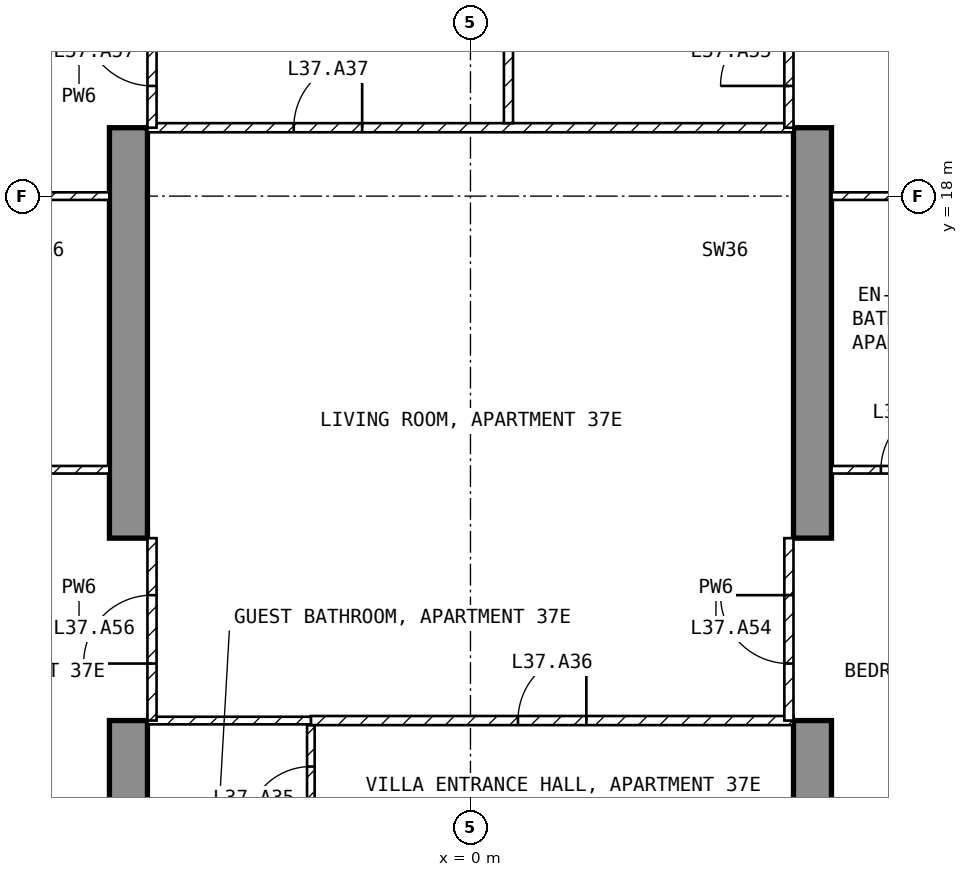
"""IFC4 building model, lengths in metres.
Left out: names, types, materials, properties, quantities, classifications, styles, units other than length and angle.
Written with IfcOpenShell. Run it as: python <this file> out.ifc"""

import sys

from ifc_helpers import new_model, si_unit, direction, frame, frame_2d, origin, place, context, subcontext, project, spatial, polyline, rectangle, outline, extrude, element, fill, save


model = new_model("IFC4")
c1 = context("Model", 3, precision=1e-05, world=origin(), true_north=direction((0.0, 1.0)))
c2 = subcontext(c1, "Body", "Model", "MODEL_VIEW")
j1 = project(units=[si_unit("LENGTHUNIT", "METRE"), si_unit("PLANEANGLEUNIT", "RADIAN")], contexts=[c1])
p1 = place(None, origin())
s1 = spatial("IfcSite", under=j1, at=p1, CompositionType="ELEMENT")
p2 = place(p1, origin())
s2 = spatial("IfcBuilding", under=s1, at=p2, CompositionType="ELEMENT")
p3 = place(p2, frame((0.0, 0.0, 151.4)))
s3 = spatial("IfcBuildingStorey", under=s2, at=p3, CompositionType="ELEMENT", Elevation=151.4)
for number, where, z_axis, x_axis in (
    (1, (-4.75, 9.0, -0.25), (1.0, 0.0, 0.0), (0.0, 1.0, 0.0)),
    (2, (4.25, 9.0, -0.25), (1.0, 0.0, 0.0), (0.0, 1.0, 0.0)),
):
    element("IfcWall", number, at=place(p3, frame(where, z_axis=z_axis, x_axis=x_axis)), inside=s3, PredefinedType="SHEAR", context=c2, shape_type="SweptSolid", body=[
        extrude(outline(polyline([(0.0, 0.0), (2.1, 0.0), (2.1, 2.65), (4.5, 2.65), (4.5, 0.0), (9.9, 0.0), (9.9, 2.65), (12.3, 2.65), (12.3, 0.0), (16.55, 0.0), (16.55, 3.45), (0.0, 3.45), (0.0, 0.0)])), origin(), (0.0, 0.0, 1.0), 0.5),
    ])
p4 = place(p3, frame((-2.1, 9.1, 0.0), z_axis=(0.0, 0.0, 1.0), x_axis=(0.0, 1.0, 0.0)))
e3 = element("IfcWall", 3, at=p4, inside=s3, PredefinedType="PARTITIONING", context=c2, shape_type="SweptSolid", body=[
    extrude(rectangle(XDim=1.94, YDim=0.1, at=frame_2d((0.97, 0.0))), origin(), (0.0, 0.0, 1.0), 3.2),
])
p5 = place(p4, frame((0.545, 0.0, 0.0)))
e4 = element("IfcOpeningElement", 4, at=p5, cuts=e3, PredefinedType="OPENING", context=c2, shape_type="SweptSolid", body=[
    extrude(rectangle(XDim=0.85, YDim=2.1, at=frame_2d((0.425, 1.05))), frame((0.0, 0.06, 0.0), z_axis=(0.0, -1.0, 0.0), x_axis=(1.0, 0.0, 0.0)), (0.0, 0.0, 1.0), 0.12),
])
p6 = place(p3, frame((-2.1, 11.1, 0.0), z_axis=(0.0, 0.0, 1.0), x_axis=(1.0, 0.0, 0.0)))
e5 = element("IfcWall", 5, at=p6, inside=s3, PredefinedType="PARTITIONING", context=c2, shape_type="SweptSolid", body=[
    extrude(rectangle(XDim=6.35, YDim=0.12, at=frame_2d((3.175, 0.0))), origin(), (0.0, 0.0, 1.0), 3.2),
])
p7 = place(p6, frame((2.725, 0.0, 0.0)))
e6 = element("IfcOpeningElement", 6, at=p7, cuts=e5, PredefinedType="OPENING", context=c2, shape_type="SweptSolid", body=[
    extrude(rectangle(XDim=0.9, YDim=2.1, at=frame_2d((0.45, 1.05))), frame((0.0, 0.07, 0.0), z_axis=(0.0, -1.0, 0.0), x_axis=(1.0, 0.0, 0.0)), (0.0, 0.0, 1.0), 0.14),
])
p8 = place(p3, frame((-4.25, 11.1, 0.0), z_axis=(0.0, 0.0, 1.0), x_axis=(1.0, 0.0, 0.0)))
e7 = element("IfcWall", 7, at=p8, inside=s3, PredefinedType="PARTITIONING", context=c2, shape_type="SweptSolid", body=[
    extrude(rectangle(XDim=2.15, YDim=0.1, at=frame_2d((1.075, 0.0))), origin(), (0.0, 0.0, 1.0), 3.2),
])
p9 = place(p3, frame((-4.25, 18.9, 0.0), z_axis=(0.0, 0.0, 1.0), x_axis=(1.0, 0.0, 0.0)))
e8 = element("IfcWall", 8, at=p9, inside=s3, PredefinedType="PARTITIONING", context=c2, shape_type="SweptSolid", body=[
    extrude(rectangle(XDim=8.5, YDim=0.12, at=frame_2d((4.25, 0.0))), origin(), (0.0, 0.0, 1.0), 3.2),
])
p10 = place(p9, frame((1.925, 0.0, 0.0)))
e9 = element("IfcOpeningElement", 9, at=p10, cuts=e8, PredefinedType="OPENING", context=c2, shape_type="SweptSolid", body=[
    extrude(rectangle(XDim=0.9, YDim=2.1, at=frame_2d((0.45, 1.05))), frame((0.0, 0.07, 0.0), z_axis=(0.0, -1.0, 0.0), x_axis=(1.0, 0.0, 0.0)), (0.0, 0.0, 1.0), 0.14),
])
p11 = place(p3, frame((0.5, 23.34, 0.0), z_axis=(0.0, 0.0, 1.0), x_axis=(0.0, -1.0, 0.0)))
e10 = element("IfcWall", 10, at=p11, inside=s3, PredefinedType="PARTITIONING", context=c2, shape_type="SweptSolid", body=[
    extrude(rectangle(XDim=4.38, YDim=0.12, at=frame_2d((2.19, 0.0))), origin(), (0.0, 0.0, 1.0), 3.2),
])
p12 = place(p11, frame((1.74, 0.0, 0.0)))
e11 = element("IfcOpeningElement", 11, at=p12, cuts=e10, PredefinedType="OPENING", context=c2, shape_type="SweptSolid", body=[
    extrude(rectangle(XDim=0.9, YDim=2.1, at=frame_2d((0.45, 1.05))), frame((0.0, 0.07, 0.0), z_axis=(0.0, -1.0, 0.0), x_axis=(1.0, 0.0, 0.0)), (0.0, 0.0, 1.0), 0.14),
])
p13 = place(p3, frame((4.75, 14.4, 0.0), z_axis=(0.0, 0.0, 1.0), x_axis=(1.0, 0.0, 0.0)))
e12 = element("IfcWall", 12, at=p13, inside=s3, PredefinedType="PARTITIONING", context=c2, shape_type="SweptSolid", body=[
    extrude(rectangle(XDim=2.2, YDim=0.1, at=frame_2d((1.1, 0.0))), origin(), (0.0, 0.0, 1.0), 3.2),
])
p14 = place(p13, frame((0.65, 0.0, 0.0)))
e13 = element("IfcOpeningElement", 13, at=p14, cuts=e12, PredefinedType="OPENING", context=c2, shape_type="SweptSolid", body=[
    extrude(rectangle(XDim=0.85, YDim=2.1, at=frame_2d((0.425, 1.05))), frame((0.0, 0.06, 0.0), z_axis=(0.0, -1.0, 0.0), x_axis=(1.0, 0.0, 0.0)), (0.0, 0.0, 1.0), 0.12),
])
p15 = place(p3, frame((4.75, 18.0, 0.0), z_axis=(0.0, 0.0, 1.0), x_axis=(1.0, 0.0, 0.0)))
e14 = element("IfcWall", 14, at=p15, inside=s3, PredefinedType="PARTITIONING", context=c2, shape_type="SweptSolid", body=[
    extrude(rectangle(XDim=2.15, YDim=0.1, at=frame_2d((1.075, 0.0))), origin(), (0.0, 0.0, 1.0), 2.364),
])
p16 = place(p3, frame((-6.95, 14.4, 0.0), z_axis=(0.0, 0.0, 1.0), x_axis=(1.0, 0.0, 0.0)))
e15 = element("IfcWall", 15, at=p16, inside=s3, PredefinedType="PARTITIONING", context=c2, shape_type="SweptSolid", body=[
    extrude(rectangle(XDim=2.2, YDim=0.1, at=frame_2d((1.1, 0.0))), origin(), (0.0, 0.0, 1.0), 3.2),
])
p17 = place(p3, frame((-6.9, 18.0, 0.0), z_axis=(0.0, 0.0, 1.0), x_axis=(1.0, 0.0, 0.0)))
e16 = element("IfcWall", 16, at=p17, inside=s3, PredefinedType="PARTITIONING", context=c2, shape_type="SweptSolid", body=[
    extrude(rectangle(XDim=2.15, YDim=0.1, at=frame_2d((1.075, 0.0))), origin(), (0.0, 0.0, 1.0), 2.364),
])
p18 = place(p3, frame((4.19, 11.1, 0.0), z_axis=(0.0, 0.0, 1.0), x_axis=(0.0, 1.0, 0.0)))
e17 = element("IfcWall", 17, at=p18, inside=s3, PredefinedType="PARTITIONING", context=c2, shape_type="SweptSolid", body=[
    extrude(rectangle(XDim=2.4, YDim=0.12, at=frame_2d((1.2, 0.0))), origin(), (0.0, 0.0, 1.0), 2.4),
])
p19 = place(p18, frame((0.75, 0.0, 0.0)))
e18 = element("IfcOpeningElement", 18, at=p19, cuts=e17, PredefinedType="OPENING", context=c2, shape_type="SweptSolid", body=[
    extrude(rectangle(XDim=0.9, YDim=2.1, at=frame_2d((0.45, 1.05))), frame((0.0, 0.07, 0.0), z_axis=(0.0, -1.0, 0.0), x_axis=(1.0, 0.0, 0.0)), (0.0, 0.0, 1.0), 0.14),
])
p20 = place(p3, frame((4.19, 18.9, 0.0), z_axis=(0.0, 0.0, 1.0), x_axis=(0.0, 1.0, 0.0)))
e19 = element("IfcWall", 19, at=p20, inside=s3, PredefinedType="PARTITIONING", context=c2, shape_type="SweptSolid", body=[
    extrude(rectangle(XDim=2.4, YDim=0.12, at=frame_2d((1.2, 0.0))), origin(), (0.0, 0.0, 1.0), 2.4),
])
p21 = place(p20, frame((0.55, 0.0, 0.0)))
e20 = element("IfcOpeningElement", 20, at=p21, cuts=e19, PredefinedType="OPENING", context=c2, shape_type="SweptSolid", body=[
    extrude(rectangle(XDim=0.9, YDim=2.1, at=frame_2d((0.45, 1.05))), frame((0.0, 0.07, 0.0), z_axis=(0.0, -1.0, 0.0), x_axis=(1.0, 0.0, 0.0)), (0.0, 0.0, 1.0), 0.14),
])
p22 = place(p3, frame((-4.19, 11.1, 0.0), z_axis=(0.0, 0.0, 1.0), x_axis=(0.0, 1.0, 0.0)))
e21 = element("IfcWall", 21, at=p22, inside=s3, PredefinedType="PARTITIONING", context=c2, shape_type="SweptSolid", body=[
    extrude(rectangle(XDim=2.4, YDim=0.12, at=frame_2d((1.2, 0.0))), origin(), (0.0, 0.0, 1.0), 2.4),
])
p23 = place(p22, frame((0.75, 0.0, 0.0)))
e22 = element("IfcOpeningElement", 22, at=p23, cuts=e21, PredefinedType="OPENING", context=c2, shape_type="SweptSolid", body=[
    extrude(rectangle(XDim=0.9, YDim=2.1, at=frame_2d((0.45, 1.05))), frame((0.0, 0.07, 0.0), z_axis=(0.0, -1.0, 0.0), x_axis=(1.0, 0.0, 0.0)), (0.0, 0.0, 1.0), 0.14),
])
p24 = place(p3, frame((-4.19, 18.9, 0.0), z_axis=(0.0, 0.0, 1.0), x_axis=(0.0, 1.0, 0.0)))
e23 = element("IfcWall", 23, at=p24, inside=s3, PredefinedType="PARTITIONING", context=c2, shape_type="SweptSolid", body=[
    extrude(rectangle(XDim=2.4, YDim=0.12, at=frame_2d((1.2, 0.0))), origin(), (0.0, 0.0, 1.0), 2.4),
])
p25 = place(p24, frame((0.55, 0.0, 0.0)))
e24 = element("IfcOpeningElement", 24, at=p25, cuts=e23, PredefinedType="OPENING", context=c2, shape_type="SweptSolid", body=[
    extrude(rectangle(XDim=0.9, YDim=2.1, at=frame_2d((0.45, 1.05))), frame((0.0, 0.07, 0.0), z_axis=(0.0, -1.0, 0.0), x_axis=(1.0, 0.0, 0.0)), (0.0, 0.0, 1.0), 0.14),
])
p26 = place(p5, origin())
e25 = element("IfcDoor", 25, at=p26, inside=s3, OperationType="SINGLE_SWING_LEFT", PredefinedType="DOOR", context=c2, shape_type="SweptSolid", body=[
    extrude(rectangle(XDim=0.85, YDim=2.1, at=frame_2d((0.425, 1.05))), frame((0.0, 0.025, 0.0), z_axis=(0.0, -1.0, 0.0), x_axis=(1.0, 0.0, 0.0)), (0.0, 0.0, 1.0), 0.05),
])
fill(e4, e25)
p27 = place(p7, origin())
e26 = element("IfcDoor", 26, at=p27, inside=s3, OperationType="SINGLE_SWING_RIGHT", PredefinedType="DOOR", context=c2, shape_type="SweptSolid", body=[
    extrude(rectangle(XDim=0.9, YDim=2.1, at=frame_2d((0.45, 1.05))), frame((0.0, 0.025, 0.0), z_axis=(0.0, -1.0, 0.0), x_axis=(1.0, 0.0, 0.0)), (0.0, 0.0, 1.0), 0.05),
])
fill(e6, e26)
p28 = place(p10, origin())
e27 = element("IfcDoor", 27, at=p28, inside=s3, OperationType="SINGLE_SWING_RIGHT", PredefinedType="DOOR", context=c2, shape_type="SweptSolid", body=[
    extrude(rectangle(XDim=0.9, YDim=2.1, at=frame_2d((0.45, 1.05))), frame((0.0, 0.025, 0.0), z_axis=(0.0, -1.0, 0.0), x_axis=(1.0, 0.0, 0.0)), (0.0, 0.0, 1.0), 0.05),
])
fill(e9, e27)
p29 = place(p14, origin())
e28 = element("IfcDoor", 28, at=p29, inside=s3, OperationType="SINGLE_SWING_RIGHT", PredefinedType="DOOR", context=c2, shape_type="SweptSolid", body=[
    extrude(rectangle(XDim=0.85, YDim=2.1, at=frame_2d((0.425, 1.05))), frame((0.0, 0.025, 0.0), z_axis=(0.0, -1.0, 0.0), x_axis=(1.0, 0.0, 0.0)), (0.0, 0.0, 1.0), 0.05),
])
fill(e13, e28)
p30 = place(p19, origin())
e29 = element("IfcDoor", 29, at=p30, inside=s3, OperationType="SINGLE_SWING_RIGHT", PredefinedType="DOOR", context=c2, shape_type="SweptSolid", body=[
    extrude(rectangle(XDim=0.9, YDim=2.1, at=frame_2d((0.45, 1.05))), frame((0.0, 0.025, 0.0), z_axis=(0.0, -1.0, 0.0), x_axis=(1.0, 0.0, 0.0)), (0.0, 0.0, 1.0), 0.05),
])
fill(e18, e29)
p31 = place(p21, origin())
e30 = element("IfcDoor", 30, at=p31, inside=s3, OperationType="SINGLE_SWING_LEFT", PredefinedType="DOOR", context=c2, shape_type="SweptSolid", body=[
    extrude(rectangle(XDim=0.9, YDim=2.1, at=frame_2d((0.45, 1.05))), frame((0.0, 0.025, 0.0), z_axis=(0.0, -1.0, 0.0), x_axis=(1.0, 0.0, 0.0)), (0.0, 0.0, 1.0), 0.05),
])
fill(e20, e30)
p32 = place(p23, origin())
e31 = element("IfcDoor", 31, at=p32, inside=s3, OperationType="SINGLE_SWING_LEFT", PredefinedType="DOOR", context=c2, shape_type="SweptSolid", body=[
    extrude(rectangle(XDim=0.9, YDim=2.1, at=frame_2d((0.45, 1.05))), frame((0.0, 0.025, 0.0), z_axis=(0.0, -1.0, 0.0), x_axis=(1.0, 0.0, 0.0)), (0.0, 0.0, 1.0), 0.05),
])
fill(e22, e31)
p33 = place(p25, origin())
e32 = element("IfcDoor", 32, at=p33, inside=s3, OperationType="SINGLE_SWING_RIGHT", PredefinedType="DOOR", context=c2, shape_type="SweptSolid", body=[
    extrude(rectangle(XDim=0.9, YDim=2.1, at=frame_2d((0.45, 1.05))), frame((0.0, 0.025, 0.0), z_axis=(0.0, -1.0, 0.0), x_axis=(1.0, 0.0, 0.0)), (0.0, 0.0, 1.0), 0.05),
])
fill(e24, e32)
save(model, sys.argv[1])
